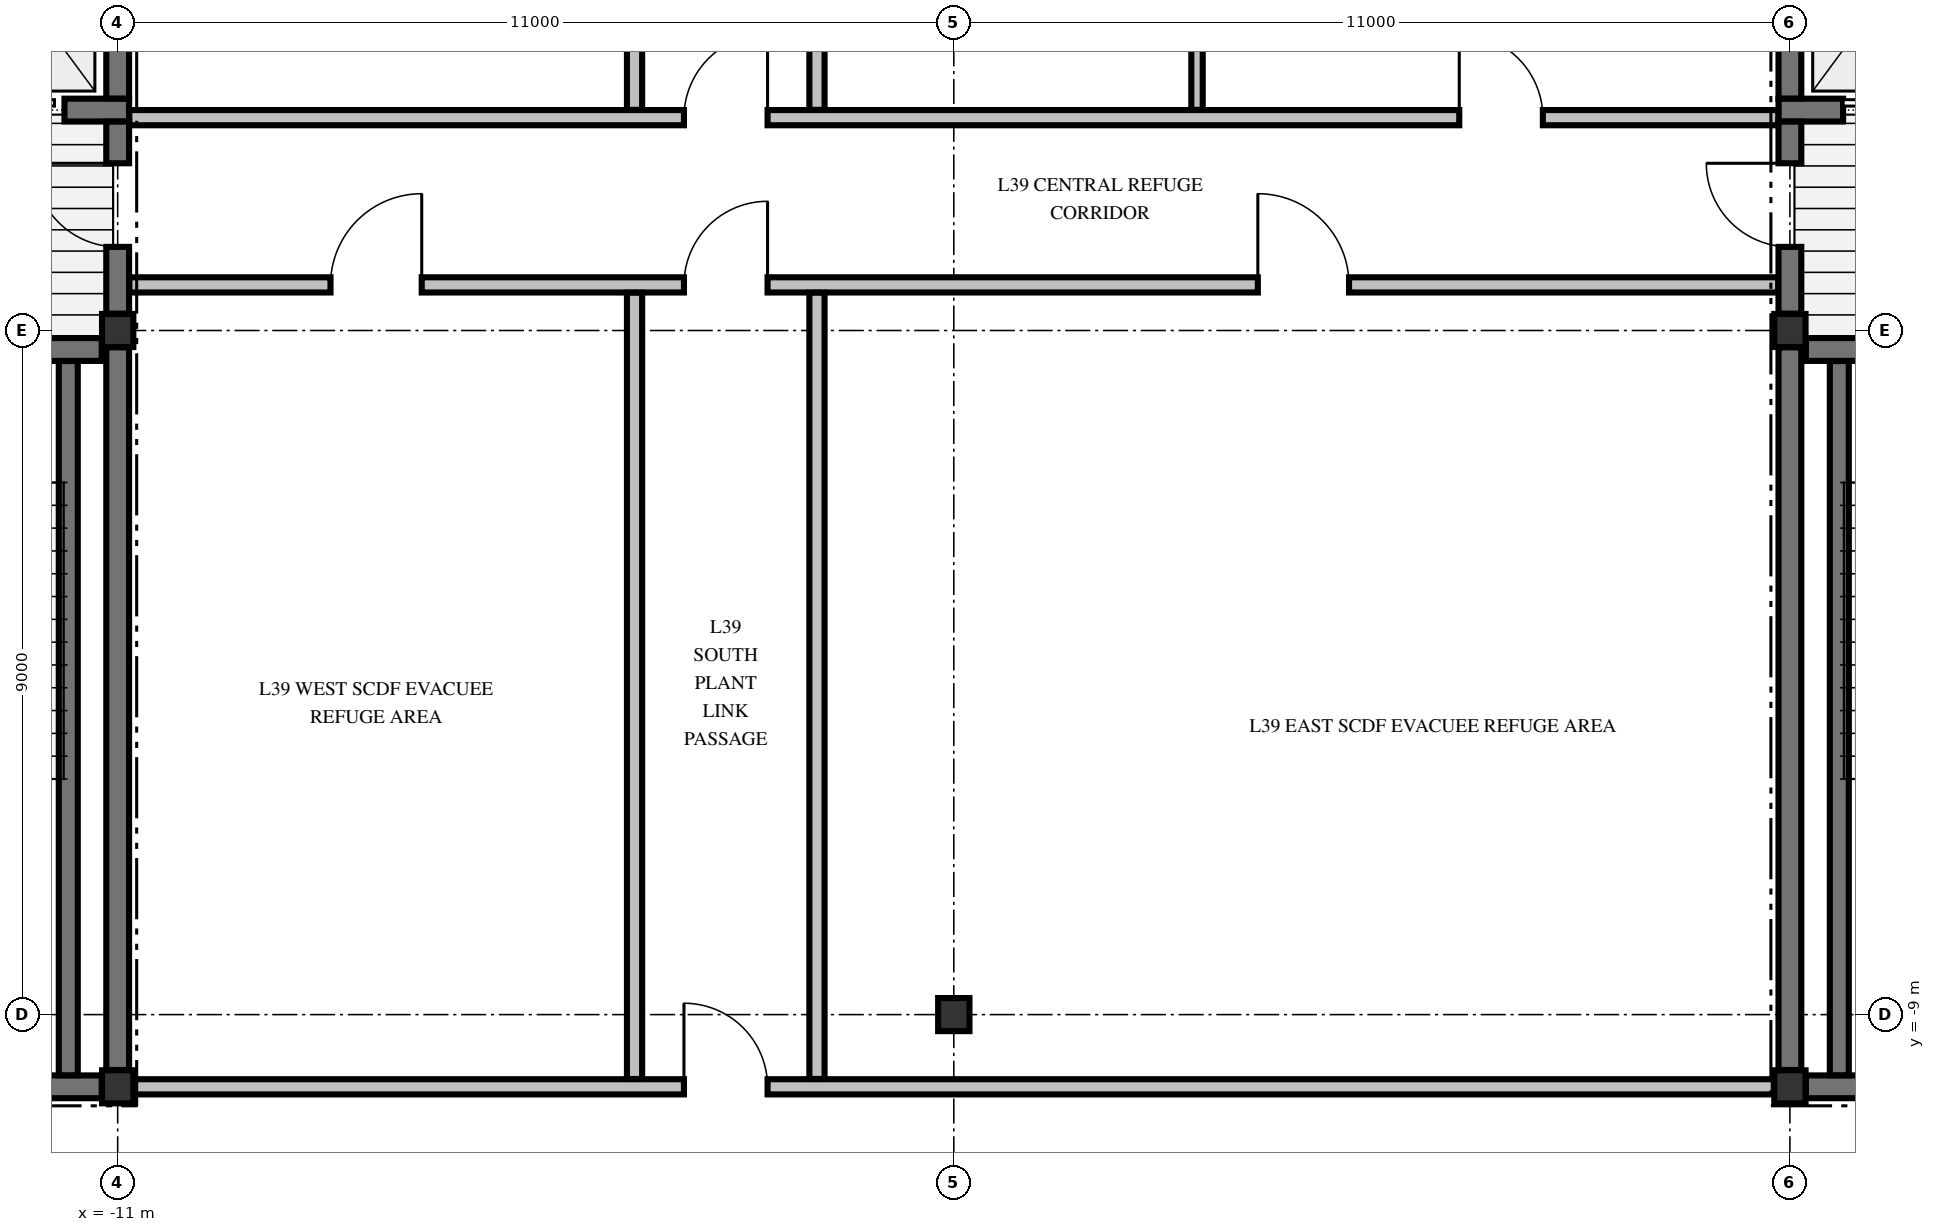
"""IFC4 building model, lengths in metres.
Left out: names, types, materials, properties, quantities, classifications, styles, units other than length and angle.
Written with IfcOpenShell. Run it as: python <this file> out.ifc"""

import sys

from ifc_helpers import new_model, si_unit, direction, frame, frame_2d, origin, origin_2d, place, context, subcontext, project, spatial, rectangle, i_section, extrude, element, fill, save


model = new_model("IFC4")
c1 = context("Model", 3, precision=1e-05, world=origin(), true_north=direction((0.0, 1.0)))
c2 = subcontext(c1, "Body", "Model", "MODEL_VIEW")
j1 = project(units=[si_unit("LENGTHUNIT", "METRE"), si_unit("PLANEANGLEUNIT", "RADIAN")], contexts=[c1])
p1 = place(None, origin())
s1 = spatial("IfcSite", under=j1, at=p1, CompositionType="ELEMENT")
p2 = place(p1, origin())
s2 = spatial("IfcBuilding", under=s1, at=p2, CompositionType="ELEMENT")
p3 = place(p2, frame((0.0, 0.0, 153.48)))
s3 = spatial("IfcBuildingStorey", under=s2, at=p3, CompositionType="ELEMENT", Elevation=153.48)
for number, where, z_axis, x_axis in (
    (1, (-11.0, -9.95, -0.425), (0.0, 0.0, 1.0), (1.0, 0.0, 0.0)),
    (2, (-11.0, 0.0, -0.425), (0.0, 0.0, 1.0), (1.0, 0.0, 0.0)),
    (3, (11.0, -9.95, -0.425), (0.0, 0.0, 1.0), (1.0, 0.0, 0.0)),
    (4, (11.0, 0.0, -0.425), (0.0, 0.0, 1.0), (1.0, 0.0, 0.0)),
    (5, (0.0, -9.0, -0.425), (0.0, 0.0, 1.0), (1.0, 0.0, 0.0)),
):
    element("IfcColumn", number, at=place(p3, frame(where, z_axis=z_axis, x_axis=x_axis)), inside=s3, PredefinedType="COLUMN", context=c2, shape_type="SweptSolid", body=[
        extrude(i_section(OverallWidth=0.412, OverallDepth=0.435, WebThickness=0.036, FlangeThickness=0.058, FilletRadius=0.015, at=origin_2d()), origin(), (0.0, 0.0, 1.0), 4.76),
    ])
for number, where, z_axis, x_axis in (
    (6, (-14.7, -9.95, 0.0), (0.0, 0.0, 1.0), (1.0, 0.0, 0.0)),
    (7, (11.21, -9.95, 0.0), (0.0, 0.0, 1.0), (1.0, 0.0, 0.0)),
):
    element("IfcWall", number, at=place(p3, frame(where, z_axis=z_axis, x_axis=x_axis)), inside=s3, PredefinedType="SHEAR", context=c2, shape_type="SweptSolid", body=[
        extrude(rectangle(XDim=3.49, YDim=0.3, at=frame_2d((1.745, 0.0))), origin(), (0.0, 0.0, 1.0), 4.335),
    ])
p4 = place(p3, frame((-19.79, -0.25, 0.0), z_axis=(0.0, 0.0, 1.0), x_axis=(1.0, 0.0, 0.0)))
e8 = element("IfcWall", 8, at=p4, inside=s3, PredefinedType="SHEAR", context=c2, shape_type="SweptSolid", body=[
    extrude(rectangle(XDim=8.58, YDim=0.3, at=frame_2d((4.29, 0.0))), origin(), (0.0, 0.0, 1.0), 4.335),
])
p5 = place(p4, frame((6.09, 0.0, 0.0)))
e9 = element("IfcOpeningElement", 9, at=p5, cuts=e8, PredefinedType="OPENING", context=c2, shape_type="SweptSolid", body=[
    extrude(rectangle(XDim=1.1, YDim=2.15, at=frame_2d((0.55, 1.075))), frame((0.0, 0.16, 0.0), z_axis=(0.0, -1.0, 0.0), x_axis=(1.0, 0.0, 0.0)), (0.0, 0.0, 1.0), 0.32),
])
p6 = place(p3, frame((11.21, -0.25, 0.0), z_axis=(0.0, 0.0, 1.0), x_axis=(1.0, 0.0, 0.0)))
e10 = element("IfcWall", 10, at=p6, inside=s3, PredefinedType="SHEAR", context=c2, shape_type="SweptSolid", body=[
    extrude(rectangle(XDim=3.665, YDim=0.3, at=frame_2d((1.833, 0.0))), origin(), (0.0, 0.0, 1.0), 4.335),
])
p7 = place(p6, frame((1.39, 0.0, 0.0)))
e11 = element("IfcOpeningElement", 11, at=p7, cuts=e10, PredefinedType="OPENING", context=c2, shape_type="SweptSolid", body=[
    extrude(rectangle(XDim=1.1, YDim=2.15, at=frame_2d((0.55, 1.075))), frame((0.0, 0.16, 0.0), z_axis=(0.0, -1.0, 0.0), x_axis=(1.0, 0.0, 0.0)), (0.0, 0.0, 1.0), 0.32),
])
p8 = place(p3, frame((-14.875, 2.9, 0.0), z_axis=(0.0, 0.0, 1.0), x_axis=(1.0, 0.0, 0.0)))
e12 = element("IfcWall", 12, at=p8, inside=s3, PredefinedType="SHEAR", context=c2, shape_type="SweptSolid", body=[
    extrude(rectangle(XDim=4.025, YDim=0.3, at=frame_2d((2.012, 0.0))), origin(), (0.0, 0.0, 1.0), 4.335),
])
p9 = place(p8, frame((2.075, 0.0, 0.0)))
e13 = element("IfcOpeningElement", 13, at=p9, cuts=e12, PredefinedType="OPENING", context=c2, shape_type="SweptSolid", body=[
    extrude(rectangle(XDim=1.1, YDim=2.2, at=frame_2d((0.55, 1.1))), frame((0.0, 0.16, 0.0), z_axis=(0.0, -1.0, 0.0), x_axis=(1.0, 0.0, 0.0)), (0.0, 0.0, 1.0), 0.32),
])
p10 = place(p3, frame((10.85, 2.9, 0.0), z_axis=(0.0, 0.0, 1.0), x_axis=(1.0, 0.0, 0.0)))
e14 = element("IfcWall", 14, at=p10, inside=s3, PredefinedType="SHEAR", context=c2, shape_type="SweptSolid", body=[
    extrude(rectangle(XDim=4.025, YDim=0.3, at=frame_2d((2.012, 0.0))), origin(), (0.0, 0.0, 1.0), 4.335),
])
p11 = place(p10, frame((0.85, 0.0, 0.0)))
e15 = element("IfcOpeningElement", 15, at=p11, cuts=e14, PredefinedType="OPENING", context=c2, shape_type="SweptSolid", body=[
    extrude(rectangle(XDim=1.1, YDim=2.2, at=frame_2d((0.55, 1.1))), frame((0.0, 0.16, 0.0), z_axis=(0.0, -1.0, 0.0), x_axis=(1.0, 0.0, 0.0)), (0.0, 0.0, 1.0), 0.32),
])
p12 = place(p3, frame((-10.788, -9.95, 0.0), z_axis=(0.0, 0.0, 1.0), x_axis=(1.0, 0.0, 0.0)))
e16 = element("IfcWall", 16, at=p12, inside=s3, PredefinedType="PARTITIONING", context=c2, shape_type="SweptSolid", body=[
    extrude(rectangle(XDim=21.576, YDim=0.2, at=frame_2d((10.788, 0.0))), origin(), (0.0, 0.0, 1.0), 4.335),
])
p13 = place(p12, frame((7.238, 0.0, 0.0)))
e17 = element("IfcOpeningElement", 17, at=p13, cuts=e16, PredefinedType="OPENING", context=c2, shape_type="SweptSolid", body=[
    extrude(rectangle(XDim=1.1, YDim=2.15, at=frame_2d((0.55, 1.075))), frame((0.0, 0.11, 0.0), z_axis=(0.0, -1.0, 0.0), x_axis=(1.0, 0.0, 0.0)), (0.0, 0.0, 1.0), 0.22),
])
p14 = place(p3, frame((-10.847, 0.6, 0.0), z_axis=(0.0, 0.0, 1.0), x_axis=(1.0, 0.0, 0.0)))
e18 = element("IfcWall", 18, at=p14, inside=s3, PredefinedType="PARTITIONING", context=c2, shape_type="SweptSolid", body=[
    extrude(rectangle(XDim=21.694, YDim=0.2, at=frame_2d((10.847, 0.0))), origin(), (0.0, 0.0, 1.0), 4.335),
])
p15 = place(p14, frame((7.297, 0.0, 0.0)))
e19 = element("IfcOpeningElement", 19, at=p15, cuts=e18, PredefinedType="OPENING", context=c2, shape_type="SweptSolid", body=[
    extrude(rectangle(XDim=1.1, YDim=2.15, at=frame_2d((0.55, 1.075))), frame((0.0, 0.11, 0.0), z_axis=(0.0, -1.0, 0.0), x_axis=(1.0, 0.0, 0.0)), (0.0, 0.0, 1.0), 0.22),
])
p16 = place(p14, frame((2.647, 0.0, 0.0)))
e20 = element("IfcOpeningElement", 20, at=p16, cuts=e18, PredefinedType="OPENING", context=c2, shape_type="SweptSolid", body=[
    extrude(rectangle(XDim=1.2, YDim=2.15, at=frame_2d((0.6, 1.075))), frame((0.0, 0.11, 0.0), z_axis=(0.0, -1.0, 0.0), x_axis=(1.0, 0.0, 0.0)), (0.0, 0.0, 1.0), 0.22),
])
p17 = place(p14, frame((14.847, 0.0, 0.0)))
e21 = element("IfcOpeningElement", 21, at=p17, cuts=e18, PredefinedType="OPENING", context=c2, shape_type="SweptSolid", body=[
    extrude(rectangle(XDim=1.2, YDim=2.15, at=frame_2d((0.6, 1.075))), frame((0.0, 0.11, 0.0), z_axis=(0.0, -1.0, 0.0), x_axis=(1.0, 0.0, 0.0)), (0.0, 0.0, 1.0), 0.22),
])
p18 = place(p3, frame((-10.847, 2.8, 0.0), z_axis=(0.0, 0.0, 1.0), x_axis=(1.0, 0.0, 0.0)))
e22 = element("IfcWall", 22, at=p18, inside=s3, PredefinedType="PARTITIONING", context=c2, shape_type="SweptSolid", body=[
    extrude(rectangle(XDim=21.694, YDim=0.2, at=frame_2d((10.847, 0.0))), origin(), (0.0, 0.0, 1.0), 4.335),
])
p19 = place(p18, frame((7.297, 0.0, 0.0)))
e23 = element("IfcOpeningElement", 23, at=p19, cuts=e22, PredefinedType="OPENING", context=c2, shape_type="SweptSolid", body=[
    extrude(rectangle(XDim=1.1, YDim=2.15, at=frame_2d((0.55, 1.075))), frame((0.0, 0.11, 0.0), z_axis=(0.0, -1.0, 0.0), x_axis=(1.0, 0.0, 0.0)), (0.0, 0.0, 1.0), 0.22),
])
p20 = place(p18, frame((17.497, 0.0, 0.0)))
e24 = element("IfcOpeningElement", 24, at=p20, cuts=e22, PredefinedType="OPENING", context=c2, shape_type="SweptSolid", body=[
    extrude(rectangle(XDim=1.1, YDim=2.15, at=frame_2d((0.55, 1.075))), frame((0.0, 0.11, 0.0), z_axis=(0.0, -1.0, 0.0), x_axis=(1.0, 0.0, 0.0)), (0.0, 0.0, 1.0), 0.22),
])
p21 = place(p3, frame((-11.65, -9.798, 0.0), z_axis=(0.0, 0.0, 1.0), x_axis=(0.0, 1.0, 0.0)))
e25 = element("IfcWall", 25, at=p21, inside=s3, PredefinedType="SOLIDWALL", context=c2, shape_type="SweptSolid", body=[
    extrude(rectangle(XDim=9.396, YDim=0.25, at=frame_2d((4.698, 0.0))), origin(), (0.0, 0.0, 1.0), 4.335),
])
p22 = place(p3, frame((-11.0, -9.729, 0.0), z_axis=(0.0, 0.0, 1.0), x_axis=(0.0, 1.0, 0.0)))
e26 = element("IfcWall", 26, at=p22, inside=s3, PredefinedType="SHEAR", context=c2, shape_type="SweptSolid", body=[
    extrude(rectangle(XDim=9.507, YDim=0.3, at=frame_2d((4.753, 0.0))), origin(), (0.0, 0.0, 1.0), 4.335),
])
p23 = place(p3, frame((-11.0, 0.221, 0.0), z_axis=(0.0, 0.0, 1.0), x_axis=(0.0, 1.0, 0.0)))
e27 = element("IfcWall", 27, at=p23, inside=s3, PredefinedType="SHEAR", context=c2, shape_type="SweptSolid", body=[
    extrude(rectangle(XDim=2.527, YDim=0.3, at=frame_2d((1.263, 0.0))), origin(), (0.0, 0.0, 1.0), 4.335),
])
p24 = place(p23, frame((0.878, 0.0, 0.0)))
e28 = element("IfcOpeningElement", 28, at=p24, cuts=e27, PredefinedType="OPENING", context=c2, shape_type="SweptSolid", body=[
    extrude(rectangle(XDim=1.1, YDim=2.15, at=frame_2d((0.55, 1.075))), frame((0.0, 0.16, 0.0), z_axis=(0.0, -1.0, 0.0), x_axis=(1.0, 0.0, 0.0)), (0.0, 0.0, 1.0), 0.32),
])
p25 = place(p3, frame((-11.0, 3.052, 0.0), z_axis=(0.0, 0.0, 1.0), x_axis=(0.0, 1.0, 0.0)))
e29 = element("IfcWall", 29, at=p25, inside=s3, PredefinedType="SHEAR", context=c2, shape_type="SweptSolid", body=[
    extrude(rectangle(XDim=2.496, YDim=0.3, at=frame_2d((1.248, 0.0))), origin(), (0.0, 0.0, 1.0), 4.335),
])
p26 = place(p3, frame((11.0, -9.729, 0.0), z_axis=(0.0, 0.0, 1.0), x_axis=(0.0, 1.0, 0.0)))
e30 = element("IfcWall", 30, at=p26, inside=s3, PredefinedType="SHEAR", context=c2, shape_type="SweptSolid", body=[
    extrude(rectangle(XDim=9.507, YDim=0.3, at=frame_2d((4.753, 0.0))), origin(), (0.0, 0.0, 1.0), 4.335),
])
p27 = place(p3, frame((11.0, 0.221, 0.0), z_axis=(0.0, 0.0, 1.0), x_axis=(0.0, 1.0, 0.0)))
e31 = element("IfcWall", 31, at=p27, inside=s3, PredefinedType="SHEAR", context=c2, shape_type="SweptSolid", body=[
    extrude(rectangle(XDim=2.527, YDim=0.3, at=frame_2d((1.263, 0.0))), origin(), (0.0, 0.0, 1.0), 4.335),
])
p28 = place(p27, frame((0.878, 0.0, 0.0)))
e32 = element("IfcOpeningElement", 32, at=p28, cuts=e31, PredefinedType="OPENING", context=c2, shape_type="SweptSolid", body=[
    extrude(rectangle(XDim=1.1, YDim=2.15, at=frame_2d((0.55, 1.075))), frame((0.0, 0.16, 0.0), z_axis=(0.0, -1.0, 0.0), x_axis=(1.0, 0.0, 0.0)), (0.0, 0.0, 1.0), 0.32),
])
p29 = place(p3, frame((11.0, 3.052, 0.0), z_axis=(0.0, 0.0, 1.0), x_axis=(0.0, 1.0, 0.0)))
e33 = element("IfcWall", 33, at=p29, inside=s3, PredefinedType="SHEAR", context=c2, shape_type="SweptSolid", body=[
    extrude(rectangle(XDim=2.496, YDim=0.3, at=frame_2d((1.248, 0.0))), origin(), (0.0, 0.0, 1.0), 4.335),
])
p30 = place(p3, frame((11.65, -9.798, 0.0), z_axis=(0.0, 0.0, 1.0), x_axis=(0.0, 1.0, 0.0)))
e34 = element("IfcWall", 34, at=p30, inside=s3, PredefinedType="SOLIDWALL", context=c2, shape_type="SweptSolid", body=[
    extrude(rectangle(XDim=9.396, YDim=0.25, at=frame_2d((4.698, 0.0))), origin(), (0.0, 0.0, 1.0), 4.335),
])
p31 = place(p3, frame((-4.2, -9.847, 0.0), z_axis=(0.0, 0.0, 1.0), x_axis=(0.0, 1.0, 0.0)))
e35 = element("IfcWall", 35, at=p31, inside=s3, PredefinedType="PARTITIONING", context=c2, shape_type="SweptSolid", body=[
    extrude(rectangle(XDim=10.344, YDim=0.2, at=frame_2d((5.172, 0.0))), origin(), (0.0, 0.0, 1.0), 4.335),
])
p32 = place(p3, frame((-4.2, 2.903, 0.0), z_axis=(0.0, 0.0, 1.0), x_axis=(0.0, 1.0, 0.0)))
e36 = element("IfcWall", 36, at=p32, inside=s3, PredefinedType="PARTITIONING", context=c2, shape_type="SweptSolid", body=[
    extrude(rectangle(XDim=3.644, YDim=0.2, at=frame_2d((1.822, 0.0))), origin(), (0.0, 0.0, 1.0), 4.335),
])
p33 = place(p32, frame((1.322, 0.0, 0.0)))
e37 = element("IfcOpeningElement", 37, at=p33, cuts=e36, PredefinedType="OPENING", context=c2, shape_type="SweptSolid", body=[
    extrude(rectangle(XDim=0.95, YDim=2.15, at=frame_2d((0.475, 1.075))), frame((0.0, 0.11, 0.0), z_axis=(0.0, -1.0, 0.0), x_axis=(1.0, 0.0, 0.0)), (0.0, 0.0, 1.0), 0.22),
])
p34 = place(p3, frame((-1.8, -9.847, 0.0), z_axis=(0.0, 0.0, 1.0), x_axis=(0.0, 1.0, 0.0)))
e38 = element("IfcWall", 38, at=p34, inside=s3, PredefinedType="PARTITIONING", context=c2, shape_type="SweptSolid", body=[
    extrude(rectangle(XDim=10.344, YDim=0.2, at=frame_2d((5.172, 0.0))), origin(), (0.0, 0.0, 1.0), 4.335),
])
p35 = place(p3, frame((-1.8, 2.903, 0.0), z_axis=(0.0, 0.0, 1.0), x_axis=(0.0, 1.0, 0.0)))
e39 = element("IfcWall", 39, at=p35, inside=s3, PredefinedType="PARTITIONING", context=c2, shape_type="SweptSolid", body=[
    extrude(rectangle(XDim=3.594, YDim=0.2, at=frame_2d((1.797, 0.0))), origin(), (0.0, 0.0, 1.0), 4.335),
])
p36 = place(p35, frame((1.322, 0.0, 0.0)))
e40 = element("IfcOpeningElement", 40, at=p36, cuts=e39, PredefinedType="OPENING", context=c2, shape_type="SweptSolid", body=[
    extrude(rectangle(XDim=0.95, YDim=2.15, at=frame_2d((0.475, 1.075))), frame((0.0, 0.11, 0.0), z_axis=(0.0, -1.0, 0.0), x_axis=(1.0, 0.0, 0.0)), (0.0, 0.0, 1.0), 0.22),
])
p37 = place(p3, frame((3.2, 2.903, 0.0), z_axis=(0.0, 0.0, 1.0), x_axis=(0.0, 1.0, 0.0)))
e41 = element("IfcWall", 41, at=p37, inside=s3, PredefinedType="PARTITIONING", context=c2, shape_type="SweptSolid", body=[
    extrude(rectangle(XDim=3.594, YDim=0.15, at=frame_2d((1.797, 0.0))), origin(), (0.0, 0.0, 1.0), 4.335),
])
p38 = place(p24, origin())
e42 = element("IfcDoor", 42, at=p38, inside=s3, OperationType="SINGLE_SWING_RIGHT", PredefinedType="DOOR", context=c2, shape_type="SweptSolid", body=[
    extrude(rectangle(XDim=1.1, YDim=2.15, at=frame_2d((0.55, 1.075))), frame((0.0, 0.025, 0.0), z_axis=(0.0, -1.0, 0.0), x_axis=(1.0, 0.0, 0.0)), (0.0, 0.0, 1.0), 0.05),
])
fill(e28, e42)
p39 = place(p9, origin())
e43 = element("IfcDoor", 43, at=p39, inside=s3, OperationType="SLIDING_TO_LEFT", PredefinedType="DOOR", context=c2, shape_type="SweptSolid", body=[
    extrude(rectangle(XDim=1.1, YDim=2.2, at=frame_2d((0.55, 1.1))), frame((0.0, 0.025, 0.0), z_axis=(0.0, -1.0, 0.0), x_axis=(1.0, 0.0, 0.0)), (0.0, 0.0, 1.0), 0.05),
])
fill(e13, e43)
p40 = place(p28, origin())
e44 = element("IfcDoor", 44, at=p40, inside=s3, OperationType="SINGLE_SWING_RIGHT", PredefinedType="DOOR", context=c2, shape_type="SweptSolid", body=[
    extrude(rectangle(XDim=1.1, YDim=2.15, at=frame_2d((0.55, 1.075))), frame((0.0, 0.025, 0.0), z_axis=(0.0, -1.0, 0.0), x_axis=(1.0, 0.0, 0.0)), (0.0, 0.0, 1.0), 0.05),
])
fill(e32, e44)
p41 = place(p11, origin())
e45 = element("IfcDoor", 45, at=p41, inside=s3, OperationType="SLIDING_TO_RIGHT", PredefinedType="DOOR", context=c2, shape_type="SweptSolid", body=[
    extrude(rectangle(XDim=1.1, YDim=2.2, at=frame_2d((0.55, 1.1))), frame((0.0, 0.025, 0.0), z_axis=(0.0, -1.0, 0.0), x_axis=(1.0, 0.0, 0.0)), (0.0, 0.0, 1.0), 0.05),
])
fill(e15, e45)
p42 = place(p19, origin())
e46 = element("IfcDoor", 46, at=p42, inside=s3, OperationType="SINGLE_SWING_RIGHT", PredefinedType="DOOR", context=c2, shape_type="SweptSolid", body=[
    extrude(rectangle(XDim=1.1, YDim=2.15, at=frame_2d((0.55, 1.075))), frame((0.0, 0.025, 0.0), z_axis=(0.0, -1.0, 0.0), x_axis=(1.0, 0.0, 0.0)), (0.0, 0.0, 1.0), 0.05),
])
fill(e23, e46)
p43 = place(p15, origin())
e47 = element("IfcDoor", 47, at=p43, inside=s3, OperationType="SINGLE_SWING_RIGHT", PredefinedType="DOOR", context=c2, shape_type="SweptSolid", body=[
    extrude(rectangle(XDim=1.1, YDim=2.15, at=frame_2d((0.55, 1.075))), frame((0.0, 0.025, 0.0), z_axis=(0.0, -1.0, 0.0), x_axis=(1.0, 0.0, 0.0)), (0.0, 0.0, 1.0), 0.05),
])
fill(e19, e47)
p44 = place(p13, origin())
e48 = element("IfcDoor", 48, at=p44, inside=s3, OperationType="SINGLE_SWING_LEFT", PredefinedType="DOOR", context=c2, shape_type="SweptSolid", body=[
    extrude(rectangle(XDim=1.1, YDim=2.15, at=frame_2d((0.55, 1.075))), frame((0.0, 0.025, 0.0), z_axis=(0.0, -1.0, 0.0), x_axis=(1.0, 0.0, 0.0)), (0.0, 0.0, 1.0), 0.05),
])
fill(e17, e48)
p45 = place(p16, origin())
e49 = element("IfcDoor", 49, at=p45, inside=s3, OperationType="SINGLE_SWING_RIGHT", PredefinedType="DOOR", context=c2, shape_type="SweptSolid", body=[
    extrude(rectangle(XDim=1.2, YDim=2.15, at=frame_2d((0.6, 1.075))), frame((0.0, 0.025, 0.0), z_axis=(0.0, -1.0, 0.0), x_axis=(1.0, 0.0, 0.0)), (0.0, 0.0, 1.0), 0.05),
])
fill(e20, e49)
p46 = place(p17, origin())
e50 = element("IfcDoor", 50, at=p46, inside=s3, OperationType="SINGLE_SWING_LEFT", PredefinedType="DOOR", context=c2, shape_type="SweptSolid", body=[
    extrude(rectangle(XDim=1.2, YDim=2.15, at=frame_2d((0.6, 1.075))), frame((0.0, 0.025, 0.0), z_axis=(0.0, -1.0, 0.0), x_axis=(1.0, 0.0, 0.0)), (0.0, 0.0, 1.0), 0.05),
])
fill(e21, e50)
p47 = place(p20, origin())
e51 = element("IfcDoor", 51, at=p47, inside=s3, OperationType="SINGLE_SWING_LEFT", PredefinedType="DOOR", context=c2, shape_type="SweptSolid", body=[
    extrude(rectangle(XDim=1.1, YDim=2.15, at=frame_2d((0.55, 1.075))), frame((0.0, 0.025, 0.0), z_axis=(0.0, -1.0, 0.0), x_axis=(1.0, 0.0, 0.0)), (0.0, 0.0, 1.0), 0.05),
])
fill(e24, e51)
save(model, sys.argv[1])
